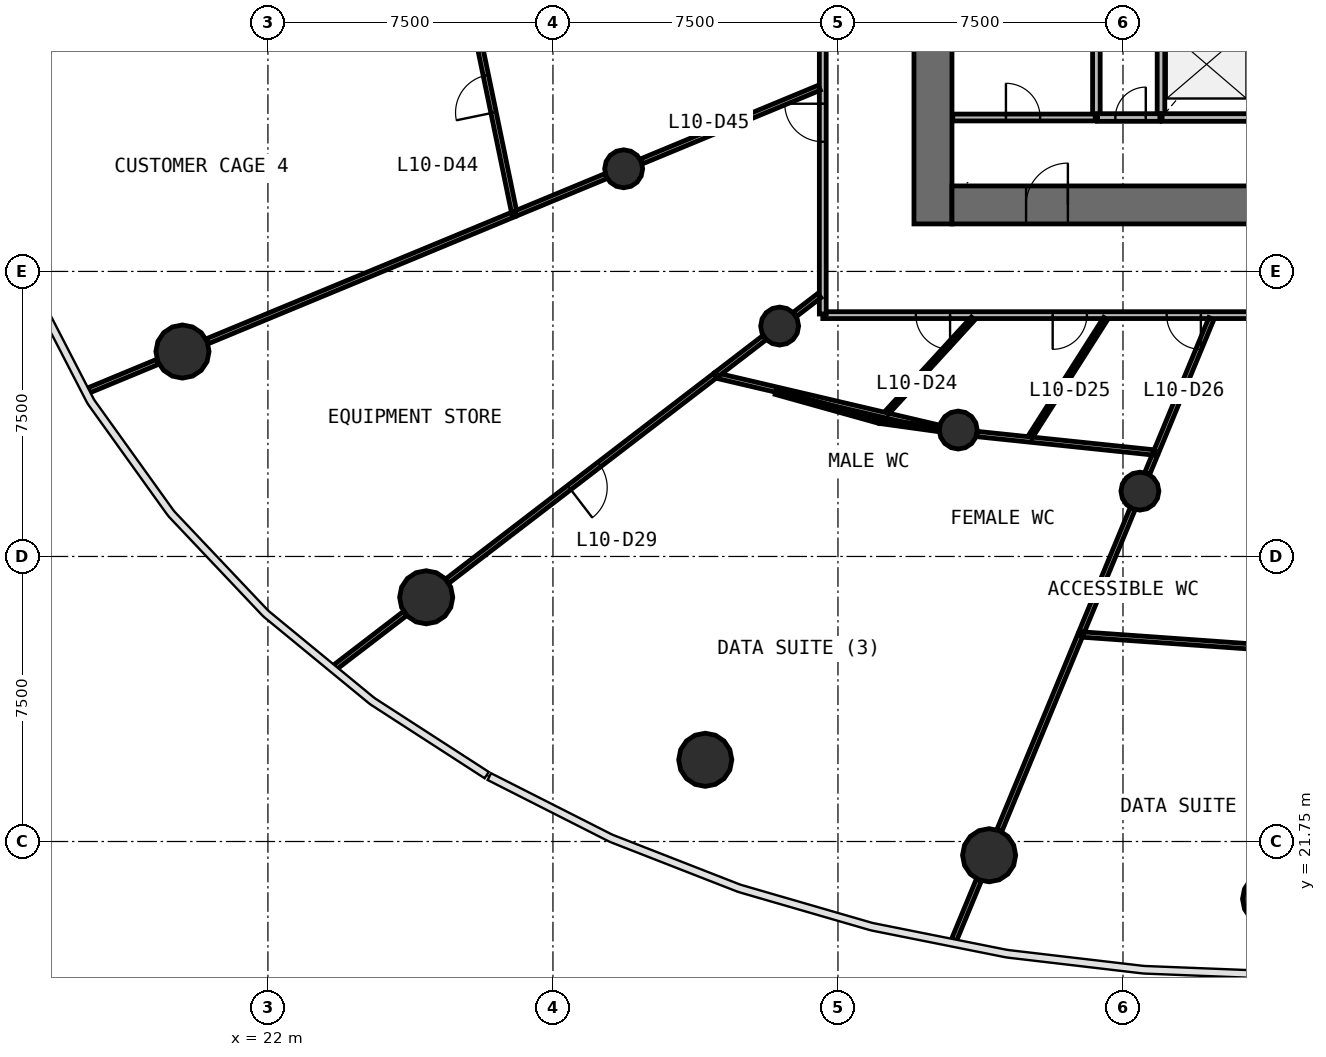
"""IFC4 building model, lengths in metres.
Left out: names, types, materials, properties, quantities, classifications, styles, units other than length and angle.
Written with IfcOpenShell. Run it as: python <this file> out.ifc"""

import sys

from ifc_helpers import new_model, si_unit, direction, frame, frame_2d, origin, origin_2d, place, context, subcontext, project, spatial, rectangle, circle, extrude, source, transform, mapped, element, fill, save


model = new_model("IFC4")
c1 = context("Model", 3, precision=1e-05, world=origin(), true_north=direction((0.0, 1.0)))
c2 = subcontext(c1, "Body", "Model", "MODEL_VIEW")
j1 = project(units=[si_unit("LENGTHUNIT", "METRE"), si_unit("PLANEANGLEUNIT", "RADIAN")], contexts=[c1])
p1 = place(None, origin())
s1 = spatial("IfcSite", under=j1, at=p1, CompositionType="ELEMENT")
p2 = place(p1, origin())
s2 = spatial("IfcBuilding", under=s1, at=p2, CompositionType="ELEMENT")
p3 = place(p2, frame((0.0, 0.0, 44.6)))
s3 = spatial("IfcBuildingStorey", under=s2, at=p3, CompositionType="ELEMENT", Elevation=44.6)
p4 = place(p3, frame((39.5, 58.0, 0.0), z_axis=(0.0, 0.0, 1.0), x_axis=(0.0, -1.0, 0.0)))
e1 = element("IfcWall", 1, at=p4, inside=s3, PredefinedType="SHEAR", context=c2, shape_type="SweptSolid", body=[
    extrude(rectangle(XDim=20.0, YDim=1.0, at=frame_2d((10.0, 0.0))), origin(), (0.0, 0.0, 1.0), 4.4),
])
p5 = place(p4, frame((9.1, 0.0, 0.0)))
e2 = element("IfcOpeningElement", 2, at=p5, cuts=e1, PredefinedType="OPENING", context=c2, shape_type="SweptSolid", body=[
    extrude(rectangle(XDim=1.8, YDim=2.1, at=frame_2d((0.9, 1.05))), frame((0.0, 0.51, 0.0), z_axis=(0.0, -1.0, 0.0), x_axis=(1.0, 0.0, 0.0)), (0.0, 0.0, 1.0), 1.02),
])
p6 = place(p3, frame((40.0, 38.5, 0.0), z_axis=(0.0, 0.0, 1.0), x_axis=(1.0, 0.0, 0.0)))
e3 = element("IfcWall", 3, at=p6, inside=s3, PredefinedType="SHEAR", context=c2, shape_type="SweptSolid", body=[
    extrude(rectangle(XDim=24.0, YDim=1.0, at=frame_2d((12.0, 0.0))), origin(), (0.0, 0.0, 1.0), 4.4),
])
p7 = place(p6, frame((21.45, 0.0, 0.0)))
e4 = element("IfcOpeningElement", 4, at=p7, cuts=e3, PredefinedType="OPENING", context=c2, shape_type="SweptSolid", body=[
    extrude(rectangle(XDim=1.1, YDim=2.1, at=frame_2d((0.55, 1.05))), frame((0.0, 0.51, 0.0), z_axis=(0.0, -1.0, 0.0), x_axis=(1.0, 0.0, 0.0)), (0.0, 0.0, 1.0), 1.02),
])
p8 = place(p6, frame((1.95, 0.0, 0.0)))
e5 = element("IfcOpeningElement", 5, at=p8, cuts=e3, PredefinedType="OPENING", context=c2, shape_type="SweptSolid", body=[
    extrude(rectangle(XDim=1.1, YDim=2.1, at=frame_2d((0.55, 1.05))), frame((0.0, 0.51, 0.0), z_axis=(0.0, -1.0, 0.0), x_axis=(1.0, 0.0, 0.0)), (0.0, 0.0, 1.0), 1.02),
])
m1 = source(origin(), c2, "Body", "SweptSolid", [
    extrude(circle(Radius=0.7, at=origin_2d()), origin(), (0.0, 0.0, 1.0), 4.4),
])
for number, where, z_axis, x_axis in (
    (6, (19.751, 34.642, 0.0), (0.0, 0.0, 1.0), (1.0, 0.0, 0.0)),
    (7, (26.164, 28.176, 0.0), (0.0, 0.0, 1.0), (1.0, 0.0, 0.0)),
    (8, (33.508, 23.9, 0.0), (0.0, 0.0, 1.0), (1.0, 0.0, 0.0)),
    (9, (40.977, 21.389, 0.0), (0.0, 0.0, 1.0), (1.0, 0.0, 0.0)),
    (10, (48.345, 20.239, 0.0), (0.0, 0.0, 1.0), (1.0, 0.0, 0.0)),
):
    element("IfcColumn", number, at=place(p3, frame(where, z_axis=z_axis, x_axis=x_axis)), inside=s3, PredefinedType="COLUMN", context=c2, shape_type="MappedRepresentation", body=[
        mapped(m1, transform((0.0, 0.0, 0.0), scale=1.0)),
    ])
m2 = source(origin(), c2, "Body", "SweptSolid", [
    extrude(circle(Radius=0.5, at=origin_2d()), origin(), (0.0, 0.0, 1.0), 4.4),
])
for number, where, z_axis, x_axis in (
    (11, (31.361, 39.451, 0.0), (0.0, 0.0, 1.0), (1.0, 0.0, 0.0)),
    (12, (35.465, 35.312, 0.0), (0.0, 0.0, 1.0), (1.0, 0.0, 0.0)),
    (13, (40.165, 32.576, 0.0), (0.0, 0.0, 1.0), (1.0, 0.0, 0.0)),
    (14, (44.945, 30.969, 0.0), (0.0, 0.0, 1.0), (1.0, 0.0, 0.0)),
):
    element("IfcColumn", number, at=place(p3, frame(where, z_axis=z_axis, x_axis=x_axis)), inside=s3, PredefinedType="COLUMN", context=c2, shape_type="MappedRepresentation", body=[
        mapped(m2, transform((0.0, 0.0, 0.0), scale=1.0)),
    ])
for number, where, z_axis, x_axis in (
    (15, (43.8, 43.6, 0.0), (0.0, 0.0, 1.0), (0.0, -1.0, 0.0)),
    (16, (45.5, 43.6, 0.0), (0.0, 0.0, 1.0), (0.0, -1.0, 0.0)),
):
    element("IfcWall", number, at=place(p3, frame(where, z_axis=z_axis, x_axis=x_axis)), inside=s3, PredefinedType="SOLIDWALL", context=c2, shape_type="SweptSolid", body=[
        extrude(rectangle(XDim=2.8, YDim=0.2, at=frame_2d((1.4, 0.0))), origin(), (0.0, 0.0, 1.0), 3.95),
    ])
p9 = place(p3, frame((45.53, 40.8, 0.0), z_axis=(0.0, 0.0, 1.0), x_axis=(1.0, 0.0, 0.0)))
e17 = element("IfcWall", 17, at=p9, inside=s3, PredefinedType="SOLIDWALL", context=c2, shape_type="SweptSolid", body=[
    extrude(rectangle(XDim=2.34, YDim=0.2, at=frame_2d((1.17, 0.0))), origin(), (0.0, 0.0, 1.0), 3.95),
])
p10 = place(p3, frame((43.83, 40.8, 0.0), z_axis=(0.0, 0.0, 1.0), x_axis=(1.0, 0.0, 0.0)))
e18 = element("IfcWall", 18, at=p10, inside=s3, PredefinedType="SOLIDWALL", context=c2, shape_type="SweptSolid", body=[
    extrude(rectangle(XDim=1.64, YDim=0.2, at=frame_2d((0.82, 0.0))), origin(), (0.0, 0.0, 1.0), 3.95),
])
p11 = place(p10, frame((0.47, 0.0, 0.0)))
e19 = element("IfcOpeningElement", 19, at=p11, cuts=e18, PredefinedType="OPENING", context=c2, shape_type="SweptSolid", body=[
    extrude(rectangle(XDim=0.8, YDim=2.1, at=frame_2d((0.4, 1.05))), frame((0.0, 0.11, 0.0), z_axis=(0.0, -1.0, 0.0), x_axis=(1.0, 0.0, 0.0)), (0.0, 0.0, 1.0), 0.22),
])
p12 = place(p3, frame((67.4, 35.6, 0.0), z_axis=(0.0, 0.0, 1.0), x_axis=(-1.0, 0.0, 0.0)))
e20 = element("IfcWall", 20, at=p12, inside=s3, PredefinedType="PARTITIONING", context=c2, shape_type="SweptSolid", body=[
    extrude(rectangle(XDim=30.8, YDim=0.18, at=frame_2d((15.4, 0.0))), origin(), (0.0, 0.0, 1.0), 3.05),
])
p13 = place(p12, frame((27.45, 0.0, 0.0)))
e21 = element("IfcOpeningElement", 21, at=p13, cuts=e20, PredefinedType="OPENING", context=c2, shape_type="SweptSolid", body=[
    extrude(rectangle(XDim=0.9, YDim=2.1, at=frame_2d((0.45, 1.05))), frame((0.0, 0.1, 0.0), z_axis=(0.0, -1.0, 0.0), x_axis=(1.0, 0.0, 0.0)), (0.0, 0.0, 1.0), 0.2),
])
p14 = place(p12, frame((23.85, 0.0, 0.0)))
e22 = element("IfcOpeningElement", 22, at=p14, cuts=e20, PredefinedType="OPENING", context=c2, shape_type="SweptSolid", body=[
    extrude(rectangle(XDim=0.9, YDim=2.1, at=frame_2d((0.45, 1.05))), frame((0.0, 0.1, 0.0), z_axis=(0.0, -1.0, 0.0), x_axis=(1.0, 0.0, 0.0)), (0.0, 0.0, 1.0), 0.2),
])
p15 = place(p12, frame((20.85, 0.0, 0.0)))
e23 = element("IfcOpeningElement", 23, at=p15, cuts=e20, PredefinedType="OPENING", context=c2, shape_type="SweptSolid", body=[
    extrude(rectangle(XDim=0.9, YDim=2.1, at=frame_2d((0.45, 1.05))), frame((0.0, 0.1, 0.0), z_axis=(0.0, -1.0, 0.0), x_axis=(1.0, 0.0, 0.0)), (0.0, 0.0, 1.0), 0.2),
])
p16 = place(p12, frame((14.95, 0.0, 0.0)))
e24 = element("IfcOpeningElement", 24, at=p16, cuts=e20, PredefinedType="OPENING", context=c2, shape_type="SweptSolid", body=[
    extrude(rectangle(XDim=1.0, YDim=2.1, at=frame_2d((0.5, 1.05))), frame((0.0, 0.1, 0.0), z_axis=(0.0, -1.0, 0.0), x_axis=(1.0, 0.0, 0.0)), (0.0, 0.0, 1.0), 0.2),
])
p17 = place(p3, frame((36.6, 35.63, 0.0), z_axis=(0.0, 0.0, 1.0), x_axis=(0.0, 1.0, 0.0)))
e25 = element("IfcWall", 25, at=p17, inside=s3, PredefinedType="PARTITIONING", context=c2, shape_type="SweptSolid", body=[
    extrude(rectangle(XDim=23.583, YDim=0.18, at=frame_2d((11.791, 0.0))), origin(), (0.0, 0.0, 1.0), 3.05),
])
p18 = place(p17, frame((11.333, 0.0, 0.0)))
e26 = element("IfcOpeningElement", 26, at=p18, cuts=e25, PredefinedType="OPENING", context=c2, shape_type="SweptSolid", body=[
    extrude(rectangle(XDim=1.0, YDim=2.1, at=frame_2d((0.5, 1.05))), frame((0.0, 0.1, 0.0), z_axis=(0.0, -1.0, 0.0), x_axis=(1.0, 0.0, 0.0)), (0.0, 0.0, 1.0), 0.2),
])
p19 = place(p17, frame((4.532, 0.0, 0.0)))
e27 = element("IfcOpeningElement", 27, at=p19, cuts=e25, PredefinedType="OPENING", context=c2, shape_type="SweptSolid", body=[
    extrude(rectangle(XDim=1.0, YDim=2.1, at=frame_2d((0.5, 1.05))), frame((0.0, 0.1, 0.0), z_axis=(0.0, -1.0, 0.0), x_axis=(1.0, 0.0, 0.0)), (0.0, 0.0, 1.0), 0.2),
])
p20 = place(p3, frame((40.02, 40.8, 0.0), z_axis=(0.0, 0.0, 1.0), x_axis=(1.0, 0.0, 0.0)))
e28 = element("IfcWall", 28, at=p20, inside=s3, PredefinedType="PARTITIONING", context=c2, shape_type="SweptSolid", body=[
    extrude(rectangle(XDim=3.75, YDim=0.18, at=frame_2d((1.875, 0.0))), origin(), (0.0, 0.0, 1.0), 3.95),
])
p21 = place(p20, frame((1.4, 0.0, 0.0)))
e29 = element("IfcOpeningElement", 29, at=p21, cuts=e28, PredefinedType="OPENING", context=c2, shape_type="SweptSolid", body=[
    extrude(rectangle(XDim=0.9, YDim=2.1, at=frame_2d((0.45, 1.05))), frame((0.0, 0.1, 0.0), z_axis=(0.0, -1.0, 0.0), x_axis=(1.0, 0.0, 0.0)), (0.0, 0.0, 1.0), 0.2),
])
p22 = place(p3, frame((33.776, 34.016, 0.0), z_axis=(0.0, 0.0, 1.0), x_axis=(-0.793363616038, -0.608748037161, 0.0)))
e30 = element("IfcWall", 30, at=p22, inside=s3, PredefinedType="PARTITIONING", context=c2, shape_type="SweptSolid", body=[
    extrude(rectangle(XDim=8.889, YDim=0.14, at=frame_2d((4.445, 0.0))), origin(), (0.0, 0.0, 1.0), 3.05),
])
p23 = place(p22, frame((3.85, 0.0, 0.0)))
e31 = element("IfcOpeningElement", 31, at=p23, cuts=e30, PredefinedType="OPENING", context=c2, shape_type="SweptSolid", body=[
    extrude(rectangle(XDim=1.0, YDim=2.1, at=frame_2d((0.5, 1.05))), frame((0.0, 0.08, 0.0), z_axis=(0.0, -1.0, 0.0), x_axis=(1.0, 0.0, 0.0)), (0.0, 0.0, 1.0), 0.16),
])
p24 = place(p3, frame((28.489, 38.261, 0.0), z_axis=(0.0, 0.0, 1.0), x_axis=(-0.923879491354, -0.382683531727, 0.0)))
e32 = element("IfcWall", 32, at=p24, inside=s3, PredefinedType="PARTITIONING", context=c2, shape_type="SweptSolid", body=[
    extrude(rectangle(XDim=8.753, YDim=0.14, at=frame_2d((4.376, 0.0))), origin(), (0.0, 0.0, 1.0), 3.05),
])
p25 = place(p3, frame((28.483, 38.291, 0.0), z_axis=(0.0, 0.0, 1.0), x_axis=(-0.202647546794, 0.979251740758, 0.0)))
e33 = element("IfcWall", 33, at=p25, inside=s3, PredefinedType="PARTITIONING", context=c2, shape_type="SweptSolid", body=[
    extrude(rectangle(XDim=6.544, YDim=0.14, at=frame_2d((3.272, 0.0))), origin(), (0.0, 0.0, 1.0), 3.05),
])
p26 = place(p25, frame((2.694, 0.0, 0.0)))
e34 = element("IfcOpeningElement", 34, at=p26, cuts=e33, PredefinedType="OPENING", context=c2, shape_type="SweptSolid", body=[
    extrude(rectangle(XDim=1.0, YDim=2.1, at=frame_2d((0.5, 1.05))), frame((0.0, 0.08, 0.0), z_axis=(0.0, -1.0, 0.0), x_axis=(1.0, 0.0, 0.0)), (0.0, 0.0, 1.0), 0.16),
])
p27 = place(p3, frame((33.805, 34.009, 0.0), z_axis=(0.0, 0.0, 1.0), x_axis=(0.973632222489, -0.22812342127, 0.0)))
e35 = element("IfcWall", 35, at=p27, inside=s3, PredefinedType="PARTITIONING", context=c2, shape_type="SweptSolid", body=[
    extrude(rectangle(XDim=6.018, YDim=0.14, at=frame_2d((3.009, 0.0))), origin(), (0.0, 0.0, 1.0), 3.05),
])
p28 = place(p3, frame((43.384, 27.199, 0.0), z_axis=(0.0, 0.0, 1.0), x_axis=(0.997508340925, -0.070548634182, 0.0)))
e36 = element("IfcWall", 36, at=p28, inside=s3, PredefinedType="PARTITIONING", context=c2, shape_type="SweptSolid", body=[
    extrude(rectangle(XDim=5.838, YDim=0.14, at=frame_2d((2.919, 0.0))), origin(), (0.0, 0.0, 1.0), 3.05),
])
p29 = place(p3, frame((43.373, 27.171, 0.0), z_axis=(0.0, 0.0, 1.0), x_axis=(-0.382670118501, -0.923885047182, 0.0)))
e37 = element("IfcWall", 37, at=p29, inside=s3, PredefinedType="PARTITIONING", context=c2, shape_type="SweptSolid", body=[
    extrude(rectangle(XDim=5.554, YDim=0.14, at=frame_2d((2.777, 0.0))), origin(), (0.0, 0.0, 1.0), 3.05),
])
p30 = place(p3, frame((36.51, 41.584, 0.0), z_axis=(0.0, 0.0, 1.0), x_axis=(-0.923890025086, -0.382658100067, 0.0)))
e38 = element("IfcWall", 38, at=p30, inside=s3, PredefinedType="PARTITIONING", context=c2, shape_type="SweptSolid", body=[
    extrude(rectangle(XDim=5.068, YDim=0.14, at=frame_2d((2.534, 0.0))), origin(), (0.0, 0.0, 1.0), 3.05),
])
p31 = place(p3, frame((40.659, 32.472, 0.0), z_axis=(0.0, 0.0, 1.0), x_axis=(0.994613201527, -0.103656062762, 0.0)))
e39 = element("IfcWall", 39, at=p31, inside=s3, PredefinedType="PARTITIONING", context=c2, shape_type="SweptSolid", body=[
    extrude(rectangle(XDim=4.732, YDim=0.14, at=frame_2d((2.366, 0.0))), origin(), (0.0, 0.0, 1.0), 3.05),
])
p32 = place(p3, frame((46.826, 35.51, 0.0), z_axis=(0.0, 0.0, 1.0), x_axis=(-0.382683759209, -0.923879397128, 0.0)))
e40 = element("IfcWall", 40, at=p32, inside=s3, PredefinedType="PARTITIONING", context=c2, shape_type="SweptSolid", body=[
    extrude(rectangle(XDim=3.789, YDim=0.14, at=frame_2d((1.895, 0.0))), origin(), (0.0, 0.0, 1.0), 3.05),
])
p33 = place(p3, frame((44.752, 30.502, 0.0), z_axis=(0.0, 0.0, 1.0), x_axis=(-0.382698672088, -0.923873219864, 0.0)))
e41 = element("IfcWall", 41, at=p33, inside=s3, PredefinedType="PARTITIONING", context=c2, shape_type="SweptSolid", body=[
    extrude(rectangle(XDim=3.502, YDim=0.14, at=frame_2d((1.751, 0.0))), origin(), (0.0, 0.0, 1.0), 3.05),
])
p34 = place(p3, frame((30.894, 39.258, 0.0), z_axis=(0.0, 0.0, 1.0), x_axis=(-0.923866506459, -0.382714878523, 0.0)))
e42 = element("IfcWall", 42, at=p34, inside=s3, PredefinedType="PARTITIONING", context=c2, shape_type="SweptSolid", body=[
    extrude(rectangle(XDim=2.573, YDim=0.14, at=frame_2d((1.287, 0.0))), origin(), (0.0, 0.0, 1.0), 3.05),
])
p35 = place(p3, frame((25.606, 27.747, 0.0), z_axis=(0.0, 0.0, 1.0), x_axis=(-0.793384830347, -0.608720388172, 0.0)))
e43 = element("IfcWall", 43, at=p35, inside=s3, PredefinedType="PARTITIONING", context=c2, shape_type="SweptSolid", body=[
    extrude(rectangle(XDim=2.324, YDim=0.14, at=frame_2d((1.162, 0.0))), origin(), (0.0, 0.0, 1.0), 3.05),
])
p36 = place(p3, frame((19.1, 34.372, 0.0), z_axis=(0.0, 0.0, 1.0), x_axis=(-0.923874199787, -0.382696306447, 0.0)))
e44 = element("IfcWall", 44, at=p36, inside=s3, PredefinedType="PARTITIONING", context=c2, shape_type="SweptSolid", body=[
    extrude(rectangle(XDim=1.961, YDim=0.14, at=frame_2d((0.98, 0.0))), origin(), (0.0, 0.0, 1.0), 3.05),
])
p37 = place(p3, frame((40.708, 20.737, 0.0), z_axis=(0.0, 0.0, 1.0), x_axis=(-0.382632674553, -0.923900555452, 0.0)))
e45 = element("IfcWall", 45, at=p37, inside=s3, PredefinedType="PARTITIONING", context=c2, shape_type="SweptSolid", body=[
    extrude(rectangle(XDim=1.714, YDim=0.14, at=frame_2d((0.857, 0.0))), origin(), (0.0, 0.0, 1.0), 3.05),
])
p38 = place(p3, frame((35.065, 35.005, 0.0), z_axis=(0.0, 0.0, 1.0), x_axis=(-0.793286864057, -0.608848052732, 0.0)))
e46 = element("IfcWall", 46, at=p38, inside=s3, PredefinedType="PARTITIONING", context=c2, shape_type="SweptSolid", body=[
    extrude(rectangle(XDim=1.587, YDim=0.14, at=frame_2d((0.793, 0.0))), origin(), (0.0, 0.0, 1.0), 3.05),
])
p39 = place(p3, frame((36.51, 36.114, 0.0), z_axis=(0.0, 0.0, 1.0), x_axis=(-0.793316076519, -0.608809989025, 0.0)))
e47 = element("IfcWall", 47, at=p39, inside=s3, PredefinedType="PARTITIONING", context=c2, shape_type="SweptSolid", body=[
    extrude(rectangle(XDim=0.812, YDim=0.14, at=frame_2d((0.406, 0.0))), origin(), (0.0, 0.0, 1.0), 3.05),
])
p40 = place(p3, frame((45.337, 31.914, 0.0), z_axis=(0.0, 0.0, 1.0), x_axis=(-0.382809221062, -0.923827419094, 0.0)))
e48 = element("IfcWall", 48, at=p40, inside=s3, PredefinedType="PARTITIONING", context=c2, shape_type="SweptSolid", body=[
    extrude(rectangle(XDim=0.519, YDim=0.14, at=frame_2d((0.259, 0.0))), origin(), (0.0, 0.0, 1.0), 3.05),
])
p41 = place(p3, frame((35.364, 33.572, 0.0), z_axis=(0.0, 0.0, 1.0), x_axis=(0.963049305084, -0.269325149172, 0.0)))
e49 = element("IfcWall", 49, at=p41, inside=s3, PredefinedType="PARTITIONING", context=c2, shape_type="SweptSolid", body=[
    extrude(rectangle(XDim=2.823, YDim=0.12, at=frame_2d((1.411, 0.0))), origin(), (0.0, 0.0, 1.0), 3.05),
])
p42 = place(p3, frame((44.043, 35.51, 0.0), z_axis=(0.0, 0.0, 1.0), x_axis=(-0.537273404115, -0.843408139177, 0.0)))
e50 = element("IfcWall", 50, at=p42, inside=s3, PredefinedType="PARTITIONING", context=c2, shape_type="SweptSolid", body=[
    extrude(rectangle(XDim=3.692, YDim=0.12, at=frame_2d((1.846, 0.0))), origin(), (0.0, 0.0, 1.0), 3.05),
])
p43 = place(p3, frame((40.555, 35.51, 0.0), z_axis=(0.0, 0.0, 1.0), x_axis=(-0.675566754316, -0.737298827114, 0.0)))
e51 = element("IfcWall", 51, at=p43, inside=s3, PredefinedType="PARTITIONING", context=c2, shape_type="SweptSolid", body=[
    extrude(rectangle(XDim=3.362, YDim=0.12, at=frame_2d((1.681, 0.0))), origin(), (0.0, 0.0, 1.0), 3.05),
])
p44 = place(p3, frame((38.112, 32.808, 0.0), z_axis=(0.0, 0.0, 1.0), x_axis=(0.990488726007, -0.137593908485, 0.0)))
e52 = element("IfcWall", 52, at=p44, inside=s3, PredefinedType="PARTITIONING", context=c2, shape_type="SweptSolid", body=[
    extrude(rectangle(XDim=1.563, YDim=0.12, at=frame_2d((0.782, 0.0))), origin(), (0.0, 0.0, 1.0), 3.05),
])
m3 = source(origin(), c2, "Body", "SweptSolid", [
    extrude(rectangle(XDim=0.8, YDim=2.1, at=frame_2d((0.4, 1.05))), frame((0.0, 0.025, 0.0), z_axis=(0.0, -1.0, 0.0), x_axis=(1.0, 0.0, 0.0)), (0.0, 0.0, 1.0), 0.05),
])
p45 = place(p11, origin())
e53 = element("IfcDoor", 53, at=p45, inside=s3, OperationType="SINGLE_SWING_RIGHT", PredefinedType="DOOR", context=c2, shape_type="MappedRepresentation", body=[
    mapped(m3, transform((0.0, 0.0, 0.0), scale=1.0)),
])
fill(e19, e53)
m4 = source(origin(), c2, "Body", "SweptSolid", [
    extrude(rectangle(XDim=1.1, YDim=2.1, at=frame_2d((0.55, 1.05))), frame((0.0, 0.025, 0.0), z_axis=(0.0, -1.0, 0.0), x_axis=(1.0, 0.0, 0.0)), (0.0, 0.0, 1.0), 0.05),
])
p46 = place(p8, origin())
e54 = element("IfcDoor", 54, at=p46, inside=s3, OperationType="SINGLE_SWING_RIGHT", PredefinedType="DOOR", context=c2, shape_type="MappedRepresentation", body=[
    mapped(m4, transform((0.0, 0.0, 0.0), scale=1.0)),
])
fill(e5, e54)
m5 = source(origin(), c2, "Body", "SweptSolid", [
    extrude(rectangle(XDim=0.9, YDim=2.1, at=frame_2d((0.45, 1.05))), frame((0.0, 0.025, 0.0), z_axis=(0.0, -1.0, 0.0), x_axis=(1.0, 0.0, 0.0)), (0.0, 0.0, 1.0), 0.05),
])
p47 = place(p13, origin())
e55 = element("IfcDoor", 55, at=p47, inside=s3, OperationType="SINGLE_SWING_LEFT", PredefinedType="DOOR", context=c2, shape_type="MappedRepresentation", body=[
    mapped(m5, transform((0.0, 0.0, 0.0), scale=1.0)),
])
fill(e21, e55)
p48 = place(p14, origin())
e56 = element("IfcDoor", 56, at=p48, inside=s3, OperationType="SINGLE_SWING_RIGHT", PredefinedType="DOOR", context=c2, shape_type="MappedRepresentation", body=[
    mapped(m5, transform((0.0, 0.0, 0.0), scale=1.0)),
])
fill(e22, e56)
p49 = place(p15, origin())
e57 = element("IfcDoor", 57, at=p49, inside=s3, OperationType="SINGLE_SWING_LEFT", PredefinedType="DOOR", context=c2, shape_type="MappedRepresentation", body=[
    mapped(m5, transform((0.0, 0.0, 0.0), scale=1.0)),
])
fill(e23, e57)
m6 = source(origin(), c2, "Body", "SweptSolid", [
    extrude(rectangle(XDim=1.0, YDim=2.1, at=frame_2d((0.5, 1.05))), frame((0.0, 0.025, 0.0), z_axis=(0.0, -1.0, 0.0), x_axis=(1.0, 0.0, 0.0)), (0.0, 0.0, 1.0), 0.05),
])
p50 = place(p23, origin())
e58 = element("IfcDoor", 58, at=p50, inside=s3, OperationType="SINGLE_SWING_RIGHT", PredefinedType="DOOR", context=c2, shape_type="MappedRepresentation", body=[
    mapped(m6, transform((0.0, 0.0, 0.0), scale=1.0)),
])
fill(e31, e58)
p51 = place(p26, origin())
e59 = element("IfcDoor", 59, at=p51, inside=s3, OperationType="SINGLE_SWING_LEFT", PredefinedType="DOOR", context=c2, shape_type="MappedRepresentation", body=[
    mapped(m6, transform((0.0, 0.0, 0.0), scale=1.0)),
])
fill(e34, e59)
p52 = place(p19, origin())
e60 = element("IfcDoor", 60, at=p52, inside=s3, OperationType="SINGLE_SWING_RIGHT", PredefinedType="DOOR", context=c2, shape_type="MappedRepresentation", body=[
    mapped(m6, transform((0.0, 0.0, 0.0), scale=1.0)),
])
fill(e27, e60)
m7 = source(origin(), c2, "Body", "SweptSolid", [
    extrude(rectangle(XDim=0.9, YDim=2.1, at=frame_2d((0.45, 1.05))), frame((0.0, 0.025, 0.0), z_axis=(0.0, -1.0, 0.0), x_axis=(1.0, 0.0, 0.0)), (0.0, 0.0, 1.0), 0.05),
])
p53 = place(p21, origin())
e61 = element("IfcDoor", 61, at=p53, inside=s3, OperationType="SINGLE_SWING_LEFT", PredefinedType="DOOR", context=c2, shape_type="MappedRepresentation", body=[
    mapped(m7, transform((0.0, 0.0, 0.0), scale=1.0)),
])
fill(e29, e61)
save(model, sys.argv[1])
